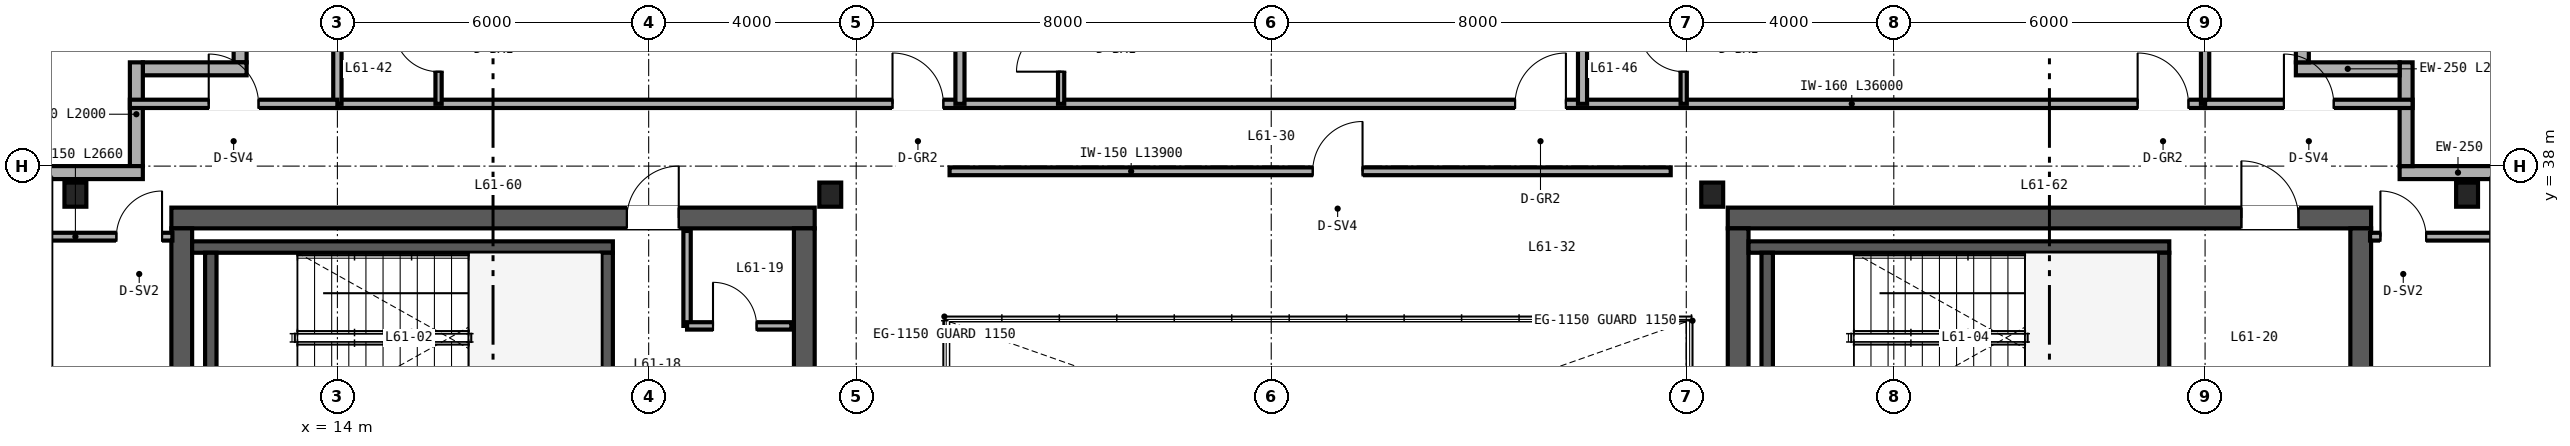
"""IFC4 building model, lengths in metres.
Left out: names, types, materials, properties, quantities, classifications, styles, units other than length and angle.
Written with IfcOpenShell. Run it as: python <this file> out.ifc"""

import sys

from ifc_helpers import new_model, si_unit, direction, frame, frame_2d, origin, origin_2d, place, context, subcontext, project, spatial, rectangle, i_section, extrude, source, transform, mapped, element, fill, save


model = new_model("IFC4")
c1 = context("Model", 3, precision=1e-05, world=origin(), true_north=direction((0.0, 1.0)))
c2 = subcontext(c1, "Body", "Model", "MODEL_VIEW")
j1 = project(units=[si_unit("LENGTHUNIT", "METRE"), si_unit("PLANEANGLEUNIT", "RADIAN")], contexts=[c1])
p1 = place(None, origin())
s1 = spatial("IfcSite", under=j1, at=p1, CompositionType="ELEMENT")
p2 = place(p1, origin())
s2 = spatial("IfcBuilding", under=s1, at=p2, CompositionType="ELEMENT")
p3 = place(p2, frame((0.0, 0.0, 243.6)))
s3 = spatial("IfcBuildingStorey", under=s2, at=p3, CompositionType="ELEMENT", Elevation=243.6)
p4 = place(p3, frame((10.8, 37.0, 0.0), z_axis=(0.0, 0.0, 1.0), x_axis=(1.0, 0.0, 0.0)))
e1 = element("IfcWall", 1, at=p4, inside=s3, PredefinedType="SHEAR", context=c2, shape_type="SweptSolid", body=[
    extrude(rectangle(XDim=12.4, YDim=0.4, at=frame_2d((6.2, 0.0))), origin(), (0.0, 0.0, 1.0), 3.28),
])
p5 = place(p4, frame((8.78, 0.0, 0.0)))
e2 = element("IfcOpeningElement", 2, at=p5, cuts=e1, PredefinedType="OPENING", context=c2, shape_type="SweptSolid", body=[
    extrude(rectangle(XDim=1.0, YDim=2.15, at=frame_2d((0.5, 1.075))), frame((0.0, 0.21, 0.0), z_axis=(0.0, -1.0, 0.0), x_axis=(1.0, 0.0, 0.0)), (0.0, 0.0, 1.0), 0.42),
])
for number, where, z_axis, x_axis in (
    (3, (11.0, 15.2, 0.0), (0.0, 0.0, 1.0), (0.0, 1.0, 0.0)),
    (4, (23.0, 15.2, 0.0), (0.0, 0.0, 1.0), (0.0, 1.0, 0.0)),
):
    element("IfcWall", number, at=place(p3, frame(where, z_axis=z_axis, x_axis=x_axis)), inside=s3, PredefinedType="SHEAR", context=c2, shape_type="SweptSolid", body=[
        extrude(rectangle(XDim=21.6, YDim=0.4, at=frame_2d((10.8, 0.0))), origin(), (0.0, 0.0, 1.0), 3.28),
    ])
p6 = place(p3, frame((40.8, 37.0, 0.0), z_axis=(0.0, 0.0, 1.0), x_axis=(1.0, 0.0, 0.0)))
e5 = element("IfcWall", 5, at=p6, inside=s3, PredefinedType="SHEAR", context=c2, shape_type="SweptSolid", body=[
    extrude(rectangle(XDim=12.4, YDim=0.4, at=frame_2d((6.2, 0.0))), origin(), (0.0, 0.0, 1.0), 3.28),
])
p7 = place(p6, frame((9.9, 0.0, 0.0)))
e6 = element("IfcOpeningElement", 6, at=p7, cuts=e5, PredefinedType="OPENING", context=c2, shape_type="SweptSolid", body=[
    extrude(rectangle(XDim=1.1, YDim=2.15, at=frame_2d((0.55, 1.075))), frame((0.0, 0.21, 0.0), z_axis=(0.0, -1.0, 0.0), x_axis=(1.0, 0.0, 0.0)), (0.0, 0.0, 1.0), 0.42),
])
for number, where, z_axis, x_axis in (
    (7, (41.0, 15.2, 0.0), (0.0, 0.0, 1.0), (0.0, 1.0, 0.0)),
    (8, (53.0, 15.2, 0.0), (0.0, 0.0, 1.0), (0.0, 1.0, 0.0)),
):
    element("IfcWall", number, at=place(p3, frame(where, z_axis=z_axis, x_axis=x_axis)), inside=s3, PredefinedType="SHEAR", context=c2, shape_type="SweptSolid", body=[
        extrude(rectangle(XDim=21.6, YDim=0.4, at=frame_2d((10.8, 0.0))), origin(), (0.0, 0.0, 1.0), 3.28),
    ])
p8 = place(p3, frame((11.2, 36.44, 0.0), z_axis=(0.0, 0.0, 1.0), x_axis=(1.0, 0.0, 0.0)))
e9 = element("IfcWall", 9, at=p8, inside=s3, PredefinedType="SHEAR", context=c2, shape_type="SweptSolid", body=[
    extrude(rectangle(XDim=8.11, YDim=0.22, at=frame_2d((4.055, 0.0))), origin(), (0.0, 0.0, 1.0), 3.4),
])
for number, where, z_axis, x_axis in (
    (10, (11.56, 33.05, 0.0), (0.0, 0.0, 1.0), (0.0, 1.0, 0.0)),
    (11, (19.2, 33.05, 0.0), (0.0, 0.0, 1.0), (0.0, 1.0, 0.0)),
):
    element("IfcWall", number, at=place(p3, frame(where, z_axis=z_axis, x_axis=x_axis)), inside=s3, PredefinedType="SHEAR", context=c2, shape_type="SweptSolid", body=[
        extrude(rectangle(XDim=3.28, YDim=0.22, at=frame_2d((1.64, 0.0))), origin(), (0.0, 0.0, 1.0), 3.4),
    ])
p9 = place(p3, frame((41.2, 36.44, 0.0), z_axis=(0.0, 0.0, 1.0), x_axis=(1.0, 0.0, 0.0)))
e12 = element("IfcWall", 12, at=p9, inside=s3, PredefinedType="SHEAR", context=c2, shape_type="SweptSolid", body=[
    extrude(rectangle(XDim=8.11, YDim=0.22, at=frame_2d((4.055, 0.0))), origin(), (0.0, 0.0, 1.0), 3.4),
])
for number, where, z_axis, x_axis in (
    (13, (41.56, 33.05, 0.0), (0.0, 0.0, 1.0), (0.0, 1.0, 0.0)),
    (14, (49.2, 33.05, 0.0), (0.0, 0.0, 1.0), (0.0, 1.0, 0.0)),
):
    element("IfcWall", number, at=place(p3, frame(where, z_axis=z_axis, x_axis=x_axis)), inside=s3, PredefinedType="SHEAR", context=c2, shape_type="SweptSolid", body=[
        extrude(rectangle(XDim=3.28, YDim=0.22, at=frame_2d((1.64, 0.0))), origin(), (0.0, 0.0, 1.0), 3.4),
    ])
m1 = source(origin(), c2, "Body", "SweptSolid", [
    extrude(i_section(OverallWidth=0.422, OverallDepth=0.465, WebThickness=0.045, FlangeThickness=0.073, FilletRadius=0.025, at=origin_2d()), origin(), (0.0, 0.0, 1.0), 3.28),
])
for number, where, z_axis, x_axis in (
    (15, (8.95, 37.45, 0.0), (0.0, 0.0, 1.0), (1.0, 0.0, 0.0)),
    (16, (23.5, 37.45, 0.0), (0.0, 0.0, 1.0), (1.0, 0.0, 0.0)),
    (17, (40.5, 37.45, 0.0), (0.0, 0.0, 1.0), (1.0, 0.0, 0.0)),
    (18, (55.05, 37.45, 0.0), (0.0, 0.0, 1.0), (1.0, 0.0, 0.0)),
):
    element("IfcColumn", number, at=place(p3, frame(where, z_axis=z_axis, x_axis=x_axis)), inside=s3, PredefinedType="COLUMN", context=c2, shape_type="MappedRepresentation", body=[
        mapped(m1, transform((0.0, 0.0, 0.0), scale=1.0)),
    ])
p10 = place(p3, frame((56.0, 37.875, 0.0), z_axis=(0.0, 0.0, 1.0), x_axis=(-1.0, 0.0, 0.0)))
e19 = element("IfcWall", 19, at=p10, inside=s3, PredefinedType="SOLIDWALL", context=c2, shape_type="SweptSolid", body=[
    extrude(rectangle(XDim=2.25, YDim=0.25, at=frame_2d((1.125, 0.0))), origin(), (0.0, 0.0, 1.0), 3.28),
])
for number, where, z_axis, x_axis in (
    (20, (53.875, 38.0, 0.0), (0.0, 0.0, 1.0), (0.0, 1.0, 0.0)),
    (21, (53.75, 39.875, 0.0), (0.0, 0.0, 1.0), (-1.0, 0.0, 0.0)),
    (22, (51.875, 40.0, 0.0), (0.0, 0.0, 1.0), (0.0, 1.0, 0.0)),
):
    element("IfcWall", number, at=place(p3, frame(where, z_axis=z_axis, x_axis=x_axis)), inside=s3, PredefinedType="SOLIDWALL", context=c2, shape_type="SweptSolid", body=[
        extrude(rectangle(XDim=2.0, YDim=0.25, at=frame_2d((1.0, 0.0))), origin(), (0.0, 0.0, 1.0), 3.28),
    ])
p11 = place(p3, frame((12.125, 42.0, 0.0), z_axis=(0.0, 0.0, 1.0), x_axis=(0.0, -1.0, 0.0)))
e23 = element("IfcWall", 23, at=p11, inside=s3, PredefinedType="SOLIDWALL", context=c2, shape_type="SweptSolid", body=[
    extrude(rectangle(XDim=2.0, YDim=0.25, at=frame_2d((1.0, 0.0))), origin(), (0.0, 0.0, 1.0), 3.28),
])
p12 = place(p11, frame((0.5, 0.0, 0.85)))
e24 = element("IfcOpeningElement", 24, at=p12, cuts=e23, PredefinedType="OPENING", context=c2, shape_type="SweptSolid", body=[
    extrude(rectangle(XDim=1.0, YDim=1.9, at=frame_2d((0.5, 0.95))), frame((0.0, 0.135, 0.0), z_axis=(0.0, -1.0, 0.0), x_axis=(1.0, 0.0, 0.0)), (0.0, 0.0, 1.0), 0.27),
])
for number, where, z_axis, x_axis in (
    (25, (12.25, 39.875, 0.0), (0.0, 0.0, 1.0), (-1.0, 0.0, 0.0)),
    (26, (10.125, 40.0, 0.0), (0.0, 0.0, 1.0), (0.0, -1.0, 0.0)),
):
    element("IfcWall", number, at=place(p3, frame(where, z_axis=z_axis, x_axis=x_axis)), inside=s3, PredefinedType="SOLIDWALL", context=c2, shape_type="SweptSolid", body=[
        extrude(rectangle(XDim=2.0, YDim=0.25, at=frame_2d((1.0, 0.0))), origin(), (0.0, 0.0, 1.0), 3.28),
    ])
p13 = place(p3, frame((10.25, 37.875, 0.0), z_axis=(0.0, 0.0, 1.0), x_axis=(-1.0, 0.0, 0.0)))
e27 = element("IfcWall", 27, at=p13, inside=s3, PredefinedType="SOLIDWALL", context=c2, shape_type="SweptSolid", body=[
    extrude(rectangle(XDim=2.25, YDim=0.25, at=frame_2d((1.125, 0.0))), origin(), (0.0, 0.0, 1.0), 3.28),
])
p14 = place(p3, frame((20.74, 34.92, 0.0), z_axis=(0.0, 0.0, 1.0), x_axis=(0.0, 1.0, 0.0)))
e28 = element("IfcWall", 28, at=p14, inside=s3, PredefinedType="PARTITIONING", context=c2, shape_type="SweptSolid", body=[
    extrude(rectangle(XDim=1.83, YDim=0.142, at=frame_2d((0.915, 0.0))), origin(), (0.0, 0.0, 1.0), 3.28),
])
p15 = place(p3, frame((20.74, 34.92, 0.0), z_axis=(0.0, 0.0, 1.0), x_axis=(1.0, 0.0, 0.0)))
e29 = element("IfcWall", 29, at=p15, inside=s3, PredefinedType="PARTITIONING", context=c2, shape_type="SweptSolid", body=[
    extrude(rectangle(XDim=2.01, YDim=0.142, at=frame_2d((1.005, 0.0))), origin(), (0.0, 0.0, 1.0), 3.28),
])
p16 = place(p15, frame((0.5, 0.0, 0.0)))
e30 = element("IfcOpeningElement", 30, at=p16, cuts=e29, PredefinedType="OPENING", context=c2, shape_type="SweptSolid", body=[
    extrude(rectangle(XDim=0.84, YDim=2.1, at=frame_2d((0.42, 1.05))), frame((0.0, 0.081, 0.0), z_axis=(0.0, -1.0, 0.0), x_axis=(1.0, 0.0, 0.0)), (0.0, 0.0, 1.0), 0.162),
])
p17 = place(p3, frame((25.8, 37.9, 0.0), z_axis=(0.0, 0.0, 1.0), x_axis=(1.0, 0.0, 0.0)))
e31 = element("IfcWall", 31, at=p17, inside=s3, PredefinedType="PARTITIONING", context=c2, shape_type="SweptSolid", body=[
    extrude(rectangle(XDim=13.9, YDim=0.15, at=frame_2d((6.95, 0.0))), origin(), (0.0, 0.0, 1.0), 3.28),
])
p18 = place(p17, frame((7.0, 0.0, 0.0)))
e32 = element("IfcOpeningElement", 32, at=p18, cuts=e31, PredefinedType="OPENING", context=c2, shape_type="SweptSolid", body=[
    extrude(rectangle(XDim=0.96, YDim=2.15, at=frame_2d((0.48, 1.075))), frame((0.0, 0.085, 0.0), z_axis=(0.0, -1.0, 0.0), x_axis=(1.0, 0.0, 0.0)), (0.0, 0.0, 1.0), 0.17),
])
p19 = place(p3, frame((14.0, 39.2, 0.0), z_axis=(0.0, 0.0, 1.0), x_axis=(1.0, 0.0, 0.0)))
e33 = element("IfcWall", 33, at=p19, inside=s3, PredefinedType="PARTITIONING", context=c2, shape_type="SweptSolid", body=[
    extrude(rectangle(XDim=36.0, YDim=0.16, at=frame_2d((18.0, 0.0))), origin(), (0.0, 0.0, 1.0), 2.823),
])
p20 = place(p19, frame((10.7, 0.0, 0.0)))
e34 = element("IfcOpeningElement", 34, at=p20, cuts=e33, PredefinedType="OPENING", context=c2, shape_type="SweptSolid", body=[
    extrude(rectangle(XDim=0.98, YDim=2.2, at=frame_2d((0.49, 1.1))), frame((0.0, 0.09, 0.0), z_axis=(0.0, -1.0, 0.0), x_axis=(1.0, 0.0, 0.0)), (0.0, 0.0, 1.0), 0.18),
])
p21 = place(p19, frame((22.7, 0.0, 0.0)))
e35 = element("IfcOpeningElement", 35, at=p21, cuts=e33, PredefinedType="OPENING", context=c2, shape_type="SweptSolid", body=[
    extrude(rectangle(XDim=0.98, YDim=2.2, at=frame_2d((0.49, 1.1))), frame((0.0, 0.09, 0.0), z_axis=(0.0, -1.0, 0.0), x_axis=(1.0, 0.0, 0.0)), (0.0, 0.0, 1.0), 0.18),
])
p22 = place(p19, frame((34.7, 0.0, 0.0)))
e36 = element("IfcOpeningElement", 36, at=p22, cuts=e33, PredefinedType="OPENING", context=c2, shape_type="SweptSolid", body=[
    extrude(rectangle(XDim=0.98, YDim=2.2, at=frame_2d((0.49, 1.1))), frame((0.0, 0.09, 0.0), z_axis=(0.0, -1.0, 0.0), x_axis=(1.0, 0.0, 0.0)), (0.0, 0.0, 1.0), 0.18),
])
for number, where, z_axis, x_axis in (
    (37, (14.0, 39.2, 0.0), (0.0, 0.0, 1.0), (0.0, 1.0, 0.0)),
    (38, (50.0, 39.2, 0.0), (0.0, 0.0, 1.0), (0.0, 1.0, 0.0)),
):
    element("IfcWall", number, at=place(p3, frame(where, z_axis=z_axis, x_axis=x_axis)), inside=s3, PredefinedType="PARTITIONING", context=c2, shape_type="SweptSolid", body=[
        extrude(rectangle(XDim=4.44, YDim=0.16, at=frame_2d((2.22, 0.0))), origin(), (0.0, 0.0, 1.0), 2.587),
    ])
p23 = place(p3, frame((26.0, 39.2, 0.0), z_axis=(0.0, 0.0, 1.0), x_axis=(0.0, 1.0, 0.0)))
e39 = element("IfcWall", 39, at=p23, inside=s3, PredefinedType="PARTITIONING", context=c2, shape_type="SweptSolid", body=[
    extrude(rectangle(XDim=4.44, YDim=0.175, at=frame_2d((2.22, 0.0))), origin(), (0.0, 0.0, 1.0), 2.36),
])
p24 = place(p3, frame((15.95, 39.2, 0.0), z_axis=(0.0, 0.0, 1.0), x_axis=(0.0, 1.0, 0.0)))
e40 = element("IfcWall", 40, at=p24, inside=s3, PredefinedType="PARTITIONING", context=c2, shape_type="SweptSolid", body=[
    extrude(rectangle(XDim=2.1, YDim=0.12, at=frame_2d((1.05, 0.0))), origin(), (0.0, 0.0, 1.0), 3.28),
])
p25 = place(p24, frame((0.62, 0.0, 0.0)))
e41 = element("IfcOpeningElement", 41, at=p25, cuts=e40, PredefinedType="OPENING", context=c2, shape_type="SweptSolid", body=[
    extrude(rectangle(XDim=0.86, YDim=2.1, at=frame_2d((0.43, 1.05))), frame((0.0, 0.07, 0.0), z_axis=(0.0, -1.0, 0.0), x_axis=(1.0, 0.0, 0.0)), (0.0, 0.0, 1.0), 0.14),
])
p26 = place(p3, frame((38.0, 39.2, 0.0), z_axis=(0.0, 0.0, 1.0), x_axis=(0.0, 1.0, 0.0)))
e42 = element("IfcWall", 42, at=p26, inside=s3, PredefinedType="PARTITIONING", context=c2, shape_type="SweptSolid", body=[
    extrude(rectangle(XDim=4.44, YDim=0.175, at=frame_2d((2.22, 0.0))), origin(), (0.0, 0.0, 1.0), 2.36),
])
p27 = place(p3, frame((27.95, 39.2, 0.0), z_axis=(0.0, 0.0, 1.0), x_axis=(0.0, 1.0, 0.0)))
e43 = element("IfcWall", 43, at=p27, inside=s3, PredefinedType="PARTITIONING", context=c2, shape_type="SweptSolid", body=[
    extrude(rectangle(XDim=2.1, YDim=0.12, at=frame_2d((1.05, 0.0))), origin(), (0.0, 0.0, 1.0), 3.28),
])
p28 = place(p27, frame((0.62, 0.0, 0.0)))
e44 = element("IfcOpeningElement", 44, at=p28, cuts=e43, PredefinedType="OPENING", context=c2, shape_type="SweptSolid", body=[
    extrude(rectangle(XDim=0.86, YDim=2.1, at=frame_2d((0.43, 1.05))), frame((0.0, 0.07, 0.0), z_axis=(0.0, -1.0, 0.0), x_axis=(1.0, 0.0, 0.0)), (0.0, 0.0, 1.0), 0.14),
])
p29 = place(p3, frame((39.95, 39.2, 0.0), z_axis=(0.0, 0.0, 1.0), x_axis=(0.0, 1.0, 0.0)))
e45 = element("IfcWall", 45, at=p29, inside=s3, PredefinedType="PARTITIONING", context=c2, shape_type="SweptSolid", body=[
    extrude(rectangle(XDim=2.1, YDim=0.12, at=frame_2d((1.05, 0.0))), origin(), (0.0, 0.0, 1.0), 3.28),
])
p30 = place(p29, frame((0.62, 0.0, 0.0)))
e46 = element("IfcOpeningElement", 46, at=p30, cuts=e45, PredefinedType="OPENING", context=c2, shape_type="SweptSolid", body=[
    extrude(rectangle(XDim=0.86, YDim=2.1, at=frame_2d((0.43, 1.05))), frame((0.0, 0.07, 0.0), z_axis=(0.0, -1.0, 0.0), x_axis=(1.0, 0.0, 0.0)), (0.0, 0.0, 1.0), 0.14),
])
p31 = place(p3, frame((8.16, 36.64, 0.0), z_axis=(0.0, 0.0, 1.0), x_axis=(1.0, 0.0, 0.0)))
e47 = element("IfcWall", 47, at=p31, inside=s3, PredefinedType="PARTITIONING", context=c2, shape_type="SweptSolid", body=[
    extrude(rectangle(XDim=2.66, YDim=0.15, at=frame_2d((1.33, 0.0))), origin(), (0.0, 0.0, 1.0), 2.663),
])
p32 = place(p31, frame((1.58, 0.0, 0.0)))
e48 = element("IfcOpeningElement", 48, at=p32, cuts=e47, PredefinedType="OPENING", context=c2, shape_type="SweptSolid", body=[
    extrude(rectangle(XDim=0.88, YDim=2.15, at=frame_2d((0.44, 1.075))), frame((0.0, 0.085, 0.0), z_axis=(0.0, -1.0, 0.0), x_axis=(1.0, 0.0, 0.0)), (0.0, 0.0, 1.0), 0.17),
])
p33 = place(p3, frame((53.18, 36.64, 0.0), z_axis=(0.0, 0.0, 1.0), x_axis=(1.0, 0.0, 0.0)))
e49 = element("IfcWall", 49, at=p33, inside=s3, PredefinedType="PARTITIONING", context=c2, shape_type="SweptSolid", body=[
    extrude(rectangle(XDim=2.66, YDim=0.15, at=frame_2d((1.33, 0.0))), origin(), (0.0, 0.0, 1.0), 2.663),
])
p34 = place(p33, frame((0.2, 0.0, 0.0)))
e50 = element("IfcOpeningElement", 50, at=p34, cuts=e49, PredefinedType="OPENING", context=c2, shape_type="SweptSolid", body=[
    extrude(rectangle(XDim=0.88, YDim=2.15, at=frame_2d((0.44, 1.075))), frame((0.0, 0.085, 0.0), z_axis=(0.0, -1.0, 0.0), x_axis=(1.0, 0.0, 0.0)), (0.0, 0.0, 1.0), 0.17),
])
p35 = place(p3, frame((10.0, 39.2, 0.0), z_axis=(0.0, 0.0, 1.0), x_axis=(1.0, 0.0, 0.0)))
e51 = element("IfcWall", 51, at=p35, inside=s3, PredefinedType="PARTITIONING", context=c2, shape_type="SweptSolid", body=[
    extrude(rectangle(XDim=4.0, YDim=0.16, at=frame_2d((2.0, 0.0))), origin(), (0.0, 0.0, 1.0), 3.28),
])
p36 = place(p35, frame((1.52, 0.0, 0.0)))
e52 = element("IfcOpeningElement", 52, at=p36, cuts=e51, PredefinedType="OPENING", context=c2, shape_type="SweptSolid", body=[
    extrude(rectangle(XDim=0.96, YDim=2.15, at=frame_2d((0.48, 1.075))), frame((0.0, 0.09, 0.0), z_axis=(0.0, -1.0, 0.0), x_axis=(1.0, 0.0, 0.0)), (0.0, 0.0, 1.0), 0.18),
])
p37 = place(p3, frame((50.0, 39.2, 0.0), z_axis=(0.0, 0.0, 1.0), x_axis=(1.0, 0.0, 0.0)))
e53 = element("IfcWall", 53, at=p37, inside=s3, PredefinedType="PARTITIONING", context=c2, shape_type="SweptSolid", body=[
    extrude(rectangle(XDim=4.0, YDim=0.16, at=frame_2d((2.0, 0.0))), origin(), (0.0, 0.0, 1.0), 3.28),
])
p38 = place(p37, frame((1.52, 0.0, 0.0)))
e54 = element("IfcOpeningElement", 54, at=p38, cuts=e53, PredefinedType="OPENING", context=c2, shape_type="SweptSolid", body=[
    extrude(rectangle(XDim=0.96, YDim=2.15, at=frame_2d((0.48, 1.075))), frame((0.0, 0.09, 0.0), z_axis=(0.0, -1.0, 0.0), x_axis=(1.0, 0.0, 0.0)), (0.0, 0.0, 1.0), 0.18),
])
m2 = source(origin(), c2, "Body", "SweptSolid", [
    extrude(rectangle(XDim=0.84, YDim=2.1, at=frame_2d((0.42, 1.05))), frame((0.0, 0.025, 0.0), z_axis=(0.0, -1.0, 0.0), x_axis=(1.0, 0.0, 0.0)), (0.0, 0.0, 1.0), 0.05),
])
p39 = place(p16, origin())
e55 = element("IfcDoor", 55, at=p39, inside=s3, OperationType="SINGLE_SWING_LEFT", PredefinedType="DOOR", context=c2, shape_type="MappedRepresentation", body=[
    mapped(m2, transform((0.0, 0.0, 0.0), scale=1.0)),
])
fill(e30, e55)
m3 = source(origin(), c2, "Body", "SweptSolid", [
    extrude(rectangle(XDim=1.0, YDim=2.15, at=frame_2d((0.5, 1.075))), frame((0.0, 0.025, 0.0), z_axis=(0.0, -1.0, 0.0), x_axis=(1.0, 0.0, 0.0)), (0.0, 0.0, 1.0), 0.05),
])
p40 = place(p5, origin())
e56 = element("IfcDoor", 56, at=p40, inside=s3, OperationType="SINGLE_SWING_RIGHT", PredefinedType="DOOR", context=c2, shape_type="MappedRepresentation", body=[
    mapped(m3, transform((0.0, 0.0, 0.0), scale=1.0)),
])
fill(e2, e56)
m4 = source(origin(), c2, "Body", "SweptSolid", [
    extrude(rectangle(XDim=1.1, YDim=2.15, at=frame_2d((0.55, 1.075))), frame((0.0, 0.025, 0.0), z_axis=(0.0, -1.0, 0.0), x_axis=(1.0, 0.0, 0.0)), (0.0, 0.0, 1.0), 0.05),
])
p41 = place(p7, origin())
e57 = element("IfcDoor", 57, at=p41, inside=s3, OperationType="SINGLE_SWING_LEFT", PredefinedType="DOOR", context=c2, shape_type="MappedRepresentation", body=[
    mapped(m4, transform((0.0, 0.0, 0.0), scale=1.0)),
])
fill(e6, e57)
m5 = source(origin(), c2, "Body", "SweptSolid", [
    extrude(rectangle(XDim=0.96, YDim=2.15, at=frame_2d((0.48, 1.075))), frame((0.0, 0.025, 0.0), z_axis=(0.0, -1.0, 0.0), x_axis=(1.0, 0.0, 0.0)), (0.0, 0.0, 1.0), 0.05),
])
p42 = place(p18, origin())
e58 = element("IfcDoor", 58, at=p42, inside=s3, OperationType="SINGLE_SWING_RIGHT", PredefinedType="DOOR", context=c2, shape_type="MappedRepresentation", body=[
    mapped(m5, transform((0.0, 0.0, 0.0), scale=1.0)),
])
fill(e32, e58)
m6 = source(origin(), c2, "Body", "SweptSolid", [
    extrude(rectangle(XDim=0.86, YDim=2.1, at=frame_2d((0.43, 1.05))), frame((0.0, 0.025, 0.0), z_axis=(0.0, -1.0, 0.0), x_axis=(1.0, 0.0, 0.0)), (0.0, 0.0, 1.0), 0.05),
])
p43 = place(p25, origin())
e59 = element("IfcDoor", 59, at=p43, inside=s3, OperationType="SINGLE_SWING_RIGHT", PredefinedType="DOOR", context=c2, shape_type="MappedRepresentation", body=[
    mapped(m6, transform((0.0, 0.0, 0.0), scale=1.0)),
])
fill(e41, e59)
p44 = place(p28, origin())
e60 = element("IfcDoor", 60, at=p44, inside=s3, OperationType="SINGLE_SWING_LEFT", PredefinedType="DOOR", context=c2, shape_type="MappedRepresentation", body=[
    mapped(m6, transform((0.0, 0.0, 0.0), scale=1.0)),
])
fill(e44, e60)
p45 = place(p30, origin())
e61 = element("IfcDoor", 61, at=p45, inside=s3, OperationType="SINGLE_SWING_RIGHT", PredefinedType="DOOR", context=c2, shape_type="MappedRepresentation", body=[
    mapped(m6, transform((0.0, 0.0, 0.0), scale=1.0)),
])
fill(e46, e61)
m7 = source(origin(), c2, "Body", "SweptSolid", [
    extrude(rectangle(XDim=0.98, YDim=2.2, at=frame_2d((0.49, 1.1))), frame((0.0, 0.025, 0.0), z_axis=(0.0, -1.0, 0.0), x_axis=(1.0, 0.0, 0.0)), (0.0, 0.0, 1.0), 0.05),
])
p46 = place(p20, origin())
e62 = element("IfcDoor", 62, at=p46, inside=s3, OperationType="SINGLE_SWING_LEFT", PredefinedType="DOOR", context=c2, shape_type="MappedRepresentation", body=[
    mapped(m7, transform((0.0, 0.0, 0.0), scale=1.0)),
])
fill(e34, e62)
p47 = place(p21, origin())
e63 = element("IfcDoor", 63, at=p47, inside=s3, OperationType="SINGLE_SWING_RIGHT", PredefinedType="DOOR", context=c2, shape_type="MappedRepresentation", body=[
    mapped(m7, transform((0.0, 0.0, 0.0), scale=1.0)),
])
fill(e35, e63)
p48 = place(p22, origin())
e64 = element("IfcDoor", 64, at=p48, inside=s3, OperationType="SINGLE_SWING_LEFT", PredefinedType="DOOR", context=c2, shape_type="MappedRepresentation", body=[
    mapped(m7, transform((0.0, 0.0, 0.0), scale=1.0)),
])
fill(e36, e64)
m8 = source(origin(), c2, "Body", "SweptSolid", [
    extrude(rectangle(XDim=0.88, YDim=2.15, at=frame_2d((0.44, 1.075))), frame((0.0, 0.025, 0.0), z_axis=(0.0, -1.0, 0.0), x_axis=(1.0, 0.0, 0.0)), (0.0, 0.0, 1.0), 0.05),
])
p49 = place(p32, origin())
e65 = element("IfcDoor", 65, at=p49, inside=s3, OperationType="SINGLE_SWING_RIGHT", PredefinedType="DOOR", context=c2, shape_type="MappedRepresentation", body=[
    mapped(m8, transform((0.0, 0.0, 0.0), scale=1.0)),
])
fill(e48, e65)
p50 = place(p34, origin())
e66 = element("IfcDoor", 66, at=p50, inside=s3, OperationType="SINGLE_SWING_LEFT", PredefinedType="DOOR", context=c2, shape_type="MappedRepresentation", body=[
    mapped(m8, transform((0.0, 0.0, 0.0), scale=1.0)),
])
fill(e50, e66)
p51 = place(p36, origin())
e67 = element("IfcDoor", 67, at=p51, inside=s3, OperationType="SINGLE_SWING_LEFT", PredefinedType="DOOR", context=c2, shape_type="MappedRepresentation", body=[
    mapped(m5, transform((0.0, 0.0, 0.0), scale=1.0)),
])
fill(e52, e67)
p52 = place(p38, origin())
e68 = element("IfcDoor", 68, at=p52, inside=s3, OperationType="SINGLE_SWING_LEFT", PredefinedType="DOOR", context=c2, shape_type="MappedRepresentation", body=[
    mapped(m5, transform((0.0, 0.0, 0.0), scale=1.0)),
])
fill(e54, e68)
save(model, sys.argv[1])
